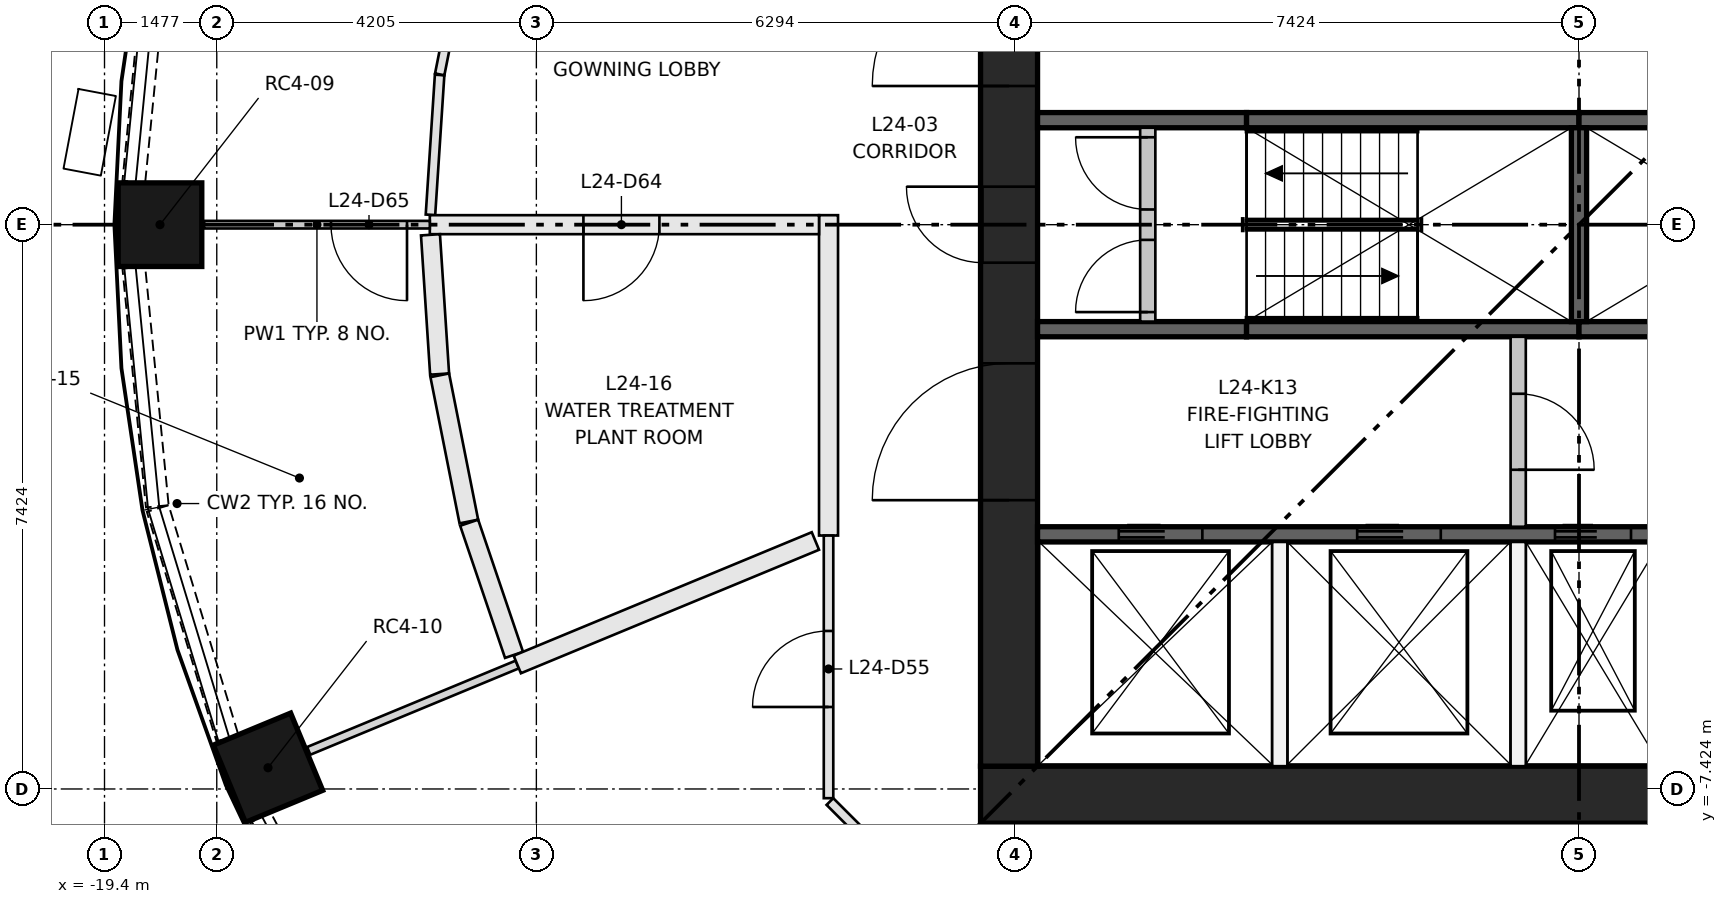
"""IFC4 building model, lengths in metres.
Left out: names, types, materials, properties, quantities, classifications, styles, units other than length and angle.
Written with IfcOpenShell. Run it as: python <this file> out.ifc"""

import sys

from ifc_helpers import new_model, si_unit, direction, frame, frame_2d, origin, origin_2d, place, context, subcontext, project, spatial, rectangle, extrude, element, fill, save


model = new_model("IFC4")
c1 = context("Model", 3, precision=1e-05, world=origin(), true_north=direction((0.0, 1.0)))
c2 = subcontext(c1, "Body", "Model", "MODEL_VIEW")
j1 = project(units=[si_unit("LENGTHUNIT", "METRE"), si_unit("PLANEANGLEUNIT", "RADIAN")], contexts=[c1])
p1 = place(None, origin())
s1 = spatial("IfcSite", under=j1, at=p1, CompositionType="ELEMENT")
p2 = place(p1, origin())
s2 = spatial("IfcBuilding", under=s1, at=p2, CompositionType="ELEMENT")
p3 = place(p2, frame((0.0, 0.0, 94.65)))
s3 = spatial("IfcBuildingStorey", under=s2, at=p3, CompositionType="ELEMENT", Elevation=94.65)
for number, where, z_axis, x_axis in (
    (1, (-18.67, 0.0, 0.0), (0.0, 0.0, 1.0), (-1.0, 0.0, 0.0)),
    (2, (-17.249, -7.145, 0.0), (0.0, 0.0, 1.0), (-0.924, -0.383, 0.0)),
):
    element("IfcColumn", number, at=place(p3, frame(where, z_axis=z_axis, x_axis=x_axis)), inside=s3, PredefinedType="COLUMN", context=c2, shape_type="SweptSolid", body=[
        extrude(rectangle(XDim=1.1, YDim=1.1, at=origin_2d()), origin(), (0.0, 0.0, 1.0), 3.65),
    ])
p4 = place(p3, frame((-7.874, -7.499, 0.0), z_axis=(0.0, 0.0, 1.0), x_axis=(1.0, 0.0, 0.0)))
e3 = element("IfcWall", 3, at=p4, inside=s3, PredefinedType="SHEAR", context=c2, shape_type="SweptSolid", body=[
    extrude(rectangle(XDim=15.748, YDim=0.75, at=frame_2d((7.874, 0.0))), origin(), (0.0, 0.0, 1.0), 3.65),
])
p5 = place(p3, frame((-7.499, -7.124, 0.0), z_axis=(0.0, 0.0, 1.0), x_axis=(0.0, 1.0, 0.0)))
e4 = element("IfcWall", 4, at=p5, inside=s3, PredefinedType="SHEAR", context=c2, shape_type="SweptSolid", body=[
    extrude(rectangle(XDim=14.248, YDim=0.75, at=frame_2d((7.124, 0.0))), origin(), (0.0, 0.0, 1.0), 3.65),
])
p6 = place(p5, frame((6.624, 0.0, 0.0)))
e5 = element("IfcOpeningElement", 5, at=p6, cuts=e4, PredefinedType="OPENING", context=c2, shape_type="SweptSolid", body=[
    extrude(rectangle(XDim=1.0, YDim=2.1, at=frame_2d((0.5, 1.05))), frame((0.0, 0.385, 0.0), z_axis=(0.0, -1.0, 0.0), x_axis=(1.0, 0.0, 0.0)), (0.0, 0.0, 1.0), 0.77),
])
p7 = place(p5, frame((3.5, 0.0, 0.0)))
e6 = element("IfcOpeningElement", 6, at=p7, cuts=e4, PredefinedType="OPENING", context=c2, shape_type="SweptSolid", body=[
    extrude(rectangle(XDim=1.8, YDim=2.1, at=frame_2d((0.9, 1.05))), frame((0.0, 0.385, 0.0), z_axis=(0.0, -1.0, 0.0), x_axis=(1.0, 0.0, 0.0)), (0.0, 0.0, 1.0), 0.77),
])
p8 = place(p5, frame((8.948, 0.0, 0.0)))
e7 = element("IfcOpeningElement", 7, at=p8, cuts=e4, PredefinedType="OPENING", context=c2, shape_type="SweptSolid", body=[
    extrude(rectangle(XDim=1.8, YDim=2.1, at=frame_2d((0.9, 1.05))), frame((0.0, 0.385, 0.0), z_axis=(0.0, -1.0, 0.0), x_axis=(1.0, 0.0, 0.0)), (0.0, 0.0, 1.0), 0.77),
])
p9 = place(p5, frame((12.124, 0.0, 0.0)))
e8 = element("IfcOpeningElement", 8, at=p9, cuts=e4, PredefinedType="OPENING", context=c2, shape_type="SweptSolid", body=[
    extrude(rectangle(XDim=1.0, YDim=2.1, at=frame_2d((0.5, 1.05))), frame((0.0, 0.385, 0.0), z_axis=(0.0, -1.0, 0.0), x_axis=(1.0, 0.0, 0.0)), (0.0, 0.0, 1.0), 0.77),
])
p10 = place(p3, frame((-7.124, -4.074, 0.0), z_axis=(0.0, 0.0, 1.0), x_axis=(1.0, 0.0, 0.0)))
e9 = element("IfcWall", 9, at=p10, inside=s3, PredefinedType="SHEAR", context=c2, shape_type="SweptSolid", body=[
    extrude(rectangle(XDim=14.248, YDim=0.2, at=frame_2d((7.124, 0.0))), origin(), (0.0, 0.0, 1.0), 3.3),
])
p11 = place(p10, frame((1.069, 0.0, 0.0)))
e10 = element("IfcOpeningElement", 10, at=p11, cuts=e9, PredefinedType="OPENING", context=c2, shape_type="SweptSolid", body=[
    extrude(rectangle(XDim=1.1, YDim=2.1, at=frame_2d((0.55, 1.05))), frame((0.0, 0.11, 0.0), z_axis=(0.0, -1.0, 0.0), x_axis=(1.0, 0.0, 0.0)), (0.0, 0.0, 1.0), 0.22),
])
p12 = place(p10, frame((4.206, 0.0, 0.0)))
e11 = element("IfcOpeningElement", 11, at=p12, cuts=e9, PredefinedType="OPENING", context=c2, shape_type="SweptSolid", body=[
    extrude(rectangle(XDim=1.1, YDim=2.1, at=frame_2d((0.55, 1.05))), frame((0.0, 0.11, 0.0), z_axis=(0.0, -1.0, 0.0), x_axis=(1.0, 0.0, 0.0)), (0.0, 0.0, 1.0), 0.22),
])
p13 = place(p10, frame((6.808, 0.0, 0.0)))
e12 = element("IfcOpeningElement", 12, at=p13, cuts=e9, PredefinedType="OPENING", context=c2, shape_type="SweptSolid", body=[
    extrude(rectangle(XDim=1.0, YDim=2.1, at=frame_2d((0.5, 1.05))), frame((0.0, 0.11, 0.0), z_axis=(0.0, -1.0, 0.0), x_axis=(1.0, 0.0, 0.0)), (0.0, 0.0, 1.0), 0.22),
])
p14 = place(p10, frame((8.777, 0.0, 0.0)))
e13 = element("IfcOpeningElement", 13, at=p14, cuts=e9, PredefinedType="OPENING", context=c2, shape_type="SweptSolid", body=[
    extrude(rectangle(XDim=1.0, YDim=2.1, at=frame_2d((0.5, 1.05))), frame((0.0, 0.11, 0.0), z_axis=(0.0, -1.0, 0.0), x_axis=(1.0, 0.0, 0.0)), (0.0, 0.0, 1.0), 0.22),
])
p15 = place(p10, frame((10.745, 0.0, 0.0)))
e14 = element("IfcOpeningElement", 14, at=p15, cuts=e9, PredefinedType="OPENING", context=c2, shape_type="SweptSolid", body=[
    extrude(rectangle(XDim=1.0, YDim=2.1, at=frame_2d((0.5, 1.05))), frame((0.0, 0.11, 0.0), z_axis=(0.0, -1.0, 0.0), x_axis=(1.0, 0.0, 0.0)), (0.0, 0.0, 1.0), 0.22),
])
p16 = place(p10, frame((12.714, 0.0, 0.0)))
e15 = element("IfcOpeningElement", 15, at=p16, cuts=e9, PredefinedType="OPENING", context=c2, shape_type="SweptSolid", body=[
    extrude(rectangle(XDim=1.0, YDim=2.1, at=frame_2d((0.5, 1.05))), frame((0.0, 0.11, 0.0), z_axis=(0.0, -1.0, 0.0), x_axis=(1.0, 0.0, 0.0)), (0.0, 0.0, 1.0), 0.22),
])
p17 = place(p3, frame((-7.124, -1.375, 0.0), z_axis=(0.0, 0.0, 1.0), x_axis=(1.0, 0.0, 0.0)))
e16 = element("IfcWall", 16, at=p17, inside=s3, PredefinedType="SHEAR", context=c2, shape_type="SweptSolid", body=[
    extrude(rectangle(XDim=2.75, YDim=0.2, at=frame_2d((1.375, 0.0))), origin(), (0.0, 0.0, 1.0), 3.3),
])
for number, where, z_axis, x_axis in (
    (17, (-4.374, -1.375, 0.0), (0.0, 0.0, 1.0), (1.0, 0.0, 0.0)),
    (18, (0.0, -1.375, 0.0), (0.0, 0.0, 1.0), (1.0, 0.0, 0.0)),
):
    element("IfcWall", number, at=place(p3, frame(where, z_axis=z_axis, x_axis=x_axis)), inside=s3, PredefinedType="SHEAR", context=c2, shape_type="SweptSolid", body=[
        extrude(rectangle(XDim=4.374, YDim=0.2, at=frame_2d((2.187, 0.0))), origin(), (0.0, 0.0, 1.0), 3.3),
    ])
p18 = place(p3, frame((-7.124, 1.375, 0.0), z_axis=(0.0, 0.0, 1.0), x_axis=(1.0, 0.0, 0.0)))
e19 = element("IfcWall", 19, at=p18, inside=s3, PredefinedType="SHEAR", context=c2, shape_type="SweptSolid", body=[
    extrude(rectangle(XDim=2.75, YDim=0.2, at=frame_2d((1.375, 0.0))), origin(), (0.0, 0.0, 1.0), 3.3),
])
for number, where, z_axis, x_axis in (
    (20, (-4.374, 1.375, 0.0), (0.0, 0.0, 1.0), (1.0, 0.0, 0.0)),
    (21, (0.0, 1.375, 0.0), (0.0, 0.0, 1.0), (1.0, 0.0, 0.0)),
):
    element("IfcWall", number, at=place(p3, frame(where, z_axis=z_axis, x_axis=x_axis)), inside=s3, PredefinedType="SHEAR", context=c2, shape_type="SweptSolid", body=[
        extrude(rectangle(XDim=4.374, YDim=0.2, at=frame_2d((2.187, 0.0))), origin(), (0.0, 0.0, 1.0), 3.3),
    ])
p19 = place(p3, frame((0.0, -1.275, 0.0), z_axis=(0.0, 0.0, 1.0), x_axis=(0.0, 1.0, 0.0)))
e22 = element("IfcWall", 22, at=p19, inside=s3, PredefinedType="SHEAR", context=c2, shape_type="SweptSolid", body=[
    extrude(rectangle(XDim=2.55, YDim=0.2, at=frame_2d((1.275, 0.0))), origin(), (0.0, 0.0, 1.0), 3.3),
])
for number, where, z_axis, x_axis in (
    (23, (-3.937, -7.124, 0.0), (0.0, 0.0, 1.0), (0.0, 1.0, 0.0)),
    (24, (-0.8, -7.124, 0.0), (0.0, 0.0, 1.0), (0.0, 1.0, 0.0)),
):
    element("IfcWall", number, at=place(p3, frame(where, z_axis=z_axis, x_axis=x_axis)), inside=s3, PredefinedType="PARTITIONING", context=c2, shape_type="SweptSolid", body=[
        extrude(rectangle(XDim=2.95, YDim=0.2, at=frame_2d((1.475, 0.0))), origin(), (0.0, 0.0, 1.0), 3.3),
    ])
p20 = place(p3, frame((-0.8, -3.974, 0.0), z_axis=(0.0, 0.0, 1.0), x_axis=(0.0, 1.0, 0.0)))
e25 = element("IfcWall", 25, at=p20, inside=s3, PredefinedType="PARTITIONING", context=c2, shape_type="SweptSolid", body=[
    extrude(rectangle(XDim=2.499, YDim=0.2, at=frame_2d((1.25, 0.0))), origin(), (0.0, 0.0, 1.0), 3.3),
])
p21 = place(p20, frame((0.75, 0.0, 0.0)))
e26 = element("IfcOpeningElement", 26, at=p21, cuts=e25, PredefinedType="OPENING", context=c2, shape_type="SweptSolid", body=[
    extrude(rectangle(XDim=1.0, YDim=2.1, at=frame_2d((0.5, 1.05))), frame((0.0, 0.11, 0.0), z_axis=(0.0, -1.0, 0.0), x_axis=(1.0, 0.0, 0.0)), (0.0, 0.0, 1.0), 0.22),
])
p22 = place(p3, frame((-5.674, -1.275, 0.0), z_axis=(0.0, 0.0, 1.0), x_axis=(0.0, 1.0, 0.0)))
e27 = element("IfcWall", 27, at=p22, inside=s3, PredefinedType="PARTITIONING", context=c2, shape_type="SweptSolid", body=[
    extrude(rectangle(XDim=2.55, YDim=0.2, at=frame_2d((1.275, 0.0))), origin(), (0.0, 0.0, 1.0), 3.3),
])
p23 = place(p22, frame((0.125, 0.0, 0.0)))
e28 = element("IfcOpeningElement", 28, at=p23, cuts=e27, PredefinedType="OPENING", context=c2, shape_type="SweptSolid", body=[
    extrude(rectangle(XDim=0.95, YDim=2.1, at=frame_2d((0.475, 1.05))), frame((0.0, 0.11, 0.0), z_axis=(0.0, -1.0, 0.0), x_axis=(1.0, 0.0, 0.0)), (0.0, 0.0, 1.0), 0.22),
])
p24 = place(p22, frame((1.475, 0.0, 0.0)))
e29 = element("IfcOpeningElement", 29, at=p24, cuts=e27, PredefinedType="OPENING", context=c2, shape_type="SweptSolid", body=[
    extrude(rectangle(XDim=0.95, YDim=2.1, at=frame_2d((0.475, 1.05))), frame((0.0, 0.11, 0.0), z_axis=(0.0, -1.0, 0.0), x_axis=(1.0, 0.0, 0.0)), (0.0, 0.0, 1.0), 0.22),
])
for number, where, z_axis, x_axis in (
    (30, (-18.706, 3.705, 0.0), (0.0, 0.0, 1.0), (-0.098, -0.995, 0.0)),
    (31, (-19.014, -0.564, 0.0), (0.0, 0.0, 1.0), (0.098, -0.995, 0.0)),
):
    element("IfcWall", number, at=place(p3, frame(where, z_axis=z_axis, x_axis=x_axis)), inside=s3, PredefinedType="SOLIDWALL", context=c2, shape_type="SweptSolid", body=[
        extrude(rectangle(XDim=3.156, YDim=0.3, at=frame_2d((1.578, 0.0))), origin(), (0.0, 0.0, 1.0), 0.9),
    ])
p25 = place(p3, frame((-18.7, -3.734, 0.0), z_axis=(0.0, 0.0, 1.0), x_axis=(0.290503096001, -0.956874051907, 0.0)))
e32 = element("IfcWall", 32, at=p25, inside=s3, PredefinedType="SOLIDWALL", context=c2, shape_type="SweptSolid", body=[
    extrude(rectangle(XDim=3.157, YDim=0.3, at=frame_2d((1.579, 0.0))), origin(), (0.0, 0.0, 1.0), 0.9),
])
p26 = place(p3, frame((-17.351, -7.797, 0.0), z_axis=(0.0, 0.0, 1.0), x_axis=(0.471238306932, -0.882005928597, 0.0)))
e33 = element("IfcWall", 33, at=p26, inside=s3, PredefinedType="SOLIDWALL", context=c2, shape_type="SweptSolid", body=[
    extrude(rectangle(XDim=3.157, YDim=0.3, at=frame_2d((1.579, 0.0))), origin(), (0.0, 0.0, 1.0), 0.9),
])
p27 = place(p3, frame((-9.874, -4.09, 0.0), z_axis=(0.0, 0.0, 1.0), x_axis=(0.0, 1.0, 0.0)))
e34 = element("IfcWall", 34, at=p27, inside=s3, PredefinedType="PARTITIONING", context=c2, shape_type="SweptSolid", body=[
    extrude(rectangle(XDim=4.215, YDim=0.25, at=frame_2d((2.107, 0.0))), origin(), (0.0, 0.0, 1.0), 3.3),
])
p28 = place(p3, frame((-9.874, -7.545, 0.0), z_axis=(0.0, 0.0, 1.0), x_axis=(0.0, 1.0, 0.0)))
e35 = element("IfcWall", 35, at=p28, inside=s3, PredefinedType="PARTITIONING", context=c2, shape_type="SweptSolid", body=[
    extrude(rectangle(XDim=3.455, YDim=0.125, at=frame_2d((1.728, 0.0))), origin(), (0.0, 0.0, 1.0), 3.3),
])
p29 = place(p28, frame((1.2, 0.0, 0.0)))
e36 = element("IfcOpeningElement", 36, at=p29, cuts=e35, PredefinedType="OPENING", context=c2, shape_type="SweptSolid", body=[
    extrude(rectangle(XDim=1.0, YDim=2.1, at=frame_2d((0.5, 1.05))), frame((0.0, 0.073, 0.0), z_axis=(0.0, -1.0, 0.0), x_axis=(1.0, 0.0, 0.0)), (0.0, 0.0, 1.0), 0.145),
])
p30 = place(p3, frame((-8.722, -8.722, 0.0), z_axis=(0.0, 0.0, 1.0), x_axis=(-0.70718294931, 0.707030604857, 0.0)))
e37 = element("IfcWall", 37, at=p30, inside=s3, PredefinedType="PARTITIONING", context=c2, shape_type="SweptSolid", body=[
    extrude(rectangle(XDim=1.603, YDim=0.125, at=frame_2d((0.801, 0.0))), origin(), (0.0, 0.0, 1.0), 3.3),
])
p31 = place(p3, frame((-15.112, 0.129, 0.0), z_axis=(0.0, 0.0, 1.0), x_axis=(0.065394347625, 0.997859498777, 0.0)))
e38 = element("IfcWall", 38, at=p31, inside=s3, PredefinedType="PARTITIONING", context=c2, shape_type="SweptSolid", body=[
    extrude(rectangle(XDim=1.844, YDim=0.125, at=frame_2d((0.922, 0.0))), origin(), (0.0, 0.0, 1.0), 3.3),
])
p32 = place(p3, frame((-14.99, 1.978, 0.0), z_axis=(0.0, 0.0, 1.0), x_axis=(0.194995562173, 0.980804124549, 0.0)))
e39 = element("IfcWall", 39, at=p32, inside=s3, PredefinedType="PARTITIONING", context=c2, shape_type="SweptSolid", body=[
    extrude(rectangle(XDim=1.969, YDim=0.125, at=frame_2d((0.985, 0.0))), origin(), (0.0, 0.0, 1.0), 3.3),
])
p33 = place(p32, frame((0.5, 0.0, 0.0)))
e40 = element("IfcOpeningElement", 40, at=p33, cuts=e39, PredefinedType="OPENING", context=c2, shape_type="SweptSolid", body=[
    extrude(rectangle(XDim=1.0, YDim=2.1, at=frame_2d((0.5, 1.05))), frame((0.0, 0.073, 0.0), z_axis=(0.0, -1.0, 0.0), x_axis=(1.0, 0.0, 0.0)), (0.0, 0.0, 1.0), 0.145),
])
p34 = place(p3, frame((-9.999, 0.0, 0.0), z_axis=(0.0, 0.0, 1.0), x_axis=(-1.0, 0.0, 0.0)))
e41 = element("IfcWall", 41, at=p34, inside=s3, PredefinedType="PARTITIONING", context=c2, shape_type="SweptSolid", body=[
    extrude(rectangle(XDim=5.121, YDim=0.25, at=frame_2d((2.561, 0.0))), origin(), (0.0, 0.0, 1.0), 3.3),
])
p35 = place(p34, frame((2.1, 0.0, 0.0)))
e42 = element("IfcOpeningElement", 42, at=p35, cuts=e41, PredefinedType="OPENING", context=c2, shape_type="SweptSolid", body=[
    extrude(rectangle(XDim=1.0, YDim=2.1, at=frame_2d((0.5, 1.05))), frame((0.0, 0.135, 0.0), z_axis=(0.0, -1.0, 0.0), x_axis=(1.0, 0.0, 0.0)), (0.0, 0.0, 1.0), 0.27),
])
p36 = place(p3, frame((-15.12, 0.0, 0.0), z_axis=(0.0, 0.0, 1.0), x_axis=(-1.0, 0.0, 0.0)))
e43 = element("IfcWall", 43, at=p36, inside=s3, PredefinedType="PARTITIONING", context=c2, shape_type="SweptSolid", body=[
    extrude(rectangle(XDim=2.97, YDim=0.1, at=frame_2d((1.485, 0.0))), origin(), (0.0, 0.0, 1.0), 3.3),
])
p37 = place(p36, frame((0.3, 0.0, 0.0)))
e44 = element("IfcOpeningElement", 44, at=p37, cuts=e43, PredefinedType="OPENING", context=c2, shape_type="SweptSolid", body=[
    extrude(rectangle(XDim=1.0, YDim=2.1, at=frame_2d((0.5, 1.05))), frame((0.0, 0.06, 0.0), z_axis=(0.0, -1.0, 0.0), x_axis=(1.0, 0.0, 0.0)), (0.0, 0.0, 1.0), 0.12),
])
p38 = place(p3, frame((-15.111, -0.133, 0.0), z_axis=(0.0, 0.0, 1.0), x_axis=(0.065424560105, -0.997857518354, 0.0)))
e45 = element("IfcWall", 45, at=p38, inside=s3, PredefinedType="PARTITIONING", context=c2, shape_type="SweptSolid", body=[
    extrude(rectangle(XDim=1.836, YDim=0.25, at=frame_2d((0.918, 0.0))), origin(), (0.0, 0.0, 1.0), 3.3),
])
p39 = place(p3, frame((-14.989, -1.982, 0.0), z_axis=(0.0, 0.0, 1.0), x_axis=(0.195062715887, -0.9807907712, 0.0)))
e46 = element("IfcWall", 46, at=p39, inside=s3, PredefinedType="PARTITIONING", context=c2, shape_type="SweptSolid", body=[
    extrude(rectangle(XDim=1.961, YDim=0.25, at=frame_2d((0.98, 0.0))), origin(), (0.0, 0.0, 1.0), 3.3),
])
p40 = place(p3, frame((-14.602, -3.921, 0.0), z_axis=(0.0, 0.0, 1.0), x_axis=(0.321528438759, -0.946899922415, 0.0)))
e47 = element("IfcWall", 47, at=p40, inside=s3, PredefinedType="PARTITIONING", context=c2, shape_type="SweptSolid", body=[
    extrude(rectangle(XDim=1.836, YDim=0.25, at=frame_2d((0.918, 0.0))), origin(), (0.0, 0.0, 1.0), 3.3),
])
p41 = place(p3, frame((-13.969, -5.786, 0.0), z_axis=(0.0, 0.0, 1.0), x_axis=(-0.923889594764, -0.382659139036, 0.0)))
e48 = element("IfcWall", 48, at=p41, inside=s3, PredefinedType="PARTITIONING", context=c2, shape_type="SweptSolid", body=[
    extrude(rectangle(XDim=2.97, YDim=0.11, at=frame_2d((1.485, 0.0))), origin(), (0.0, 0.0, 1.0), 3.3),
])
p42 = place(p3, frame((-10.047, -4.162, 0.0), z_axis=(0.0, 0.0, 1.0), x_axis=(-0.923886463326, -0.382666699469, 0.0)))
e49 = element("IfcWall", 49, at=p42, inside=s3, PredefinedType="PARTITIONING", context=c2, shape_type="SweptSolid", body=[
    extrude(rectangle(XDim=4.245, YDim=0.25, at=frame_2d((2.123, 0.0))), origin(), (0.0, 0.0, 1.0), 3.3),
])
p43 = place(p11, origin())
e50 = element("IfcDoor", 50, at=p43, inside=s3, OperationType="DOUBLE_DOOR_SLIDING", PredefinedType="DOOR", context=c2, shape_type="SweptSolid", body=[
    extrude(rectangle(XDim=1.1, YDim=2.1, at=frame_2d((0.55, 1.05))), frame((0.0, 0.025, 0.0), z_axis=(0.0, -1.0, 0.0), x_axis=(1.0, 0.0, 0.0)), (0.0, 0.0, 1.0), 0.05),
])
fill(e10, e50)
p44 = place(p12, origin())
e51 = element("IfcDoor", 51, at=p44, inside=s3, OperationType="DOUBLE_DOOR_SLIDING", PredefinedType="DOOR", context=c2, shape_type="SweptSolid", body=[
    extrude(rectangle(XDim=1.1, YDim=2.1, at=frame_2d((0.55, 1.05))), frame((0.0, 0.025, 0.0), z_axis=(0.0, -1.0, 0.0), x_axis=(1.0, 0.0, 0.0)), (0.0, 0.0, 1.0), 0.05),
])
fill(e11, e51)
p45 = place(p13, origin())
e52 = element("IfcDoor", 52, at=p45, inside=s3, OperationType="DOUBLE_DOOR_SLIDING", PredefinedType="DOOR", context=c2, shape_type="SweptSolid", body=[
    extrude(rectangle(XDim=1.0, YDim=2.1, at=frame_2d((0.5, 1.05))), frame((0.0, 0.025, 0.0), z_axis=(0.0, -1.0, 0.0), x_axis=(1.0, 0.0, 0.0)), (0.0, 0.0, 1.0), 0.05),
])
fill(e12, e52)
p46 = place(p23, origin())
e53 = element("IfcDoor", 53, at=p46, inside=s3, OperationType="SINGLE_SWING_LEFT", PredefinedType="DOOR", context=c2, shape_type="SweptSolid", body=[
    extrude(rectangle(XDim=0.95, YDim=2.1, at=frame_2d((0.475, 1.05))), frame((0.0, 0.025, 0.0), z_axis=(0.0, -1.0, 0.0), x_axis=(1.0, 0.0, 0.0)), (0.0, 0.0, 1.0), 0.05),
])
fill(e28, e53)
p47 = place(p24, origin())
e54 = element("IfcDoor", 54, at=p47, inside=s3, OperationType="SINGLE_SWING_RIGHT", PredefinedType="DOOR", context=c2, shape_type="SweptSolid", body=[
    extrude(rectangle(XDim=0.95, YDim=2.1, at=frame_2d((0.475, 1.05))), frame((0.0, 0.025, 0.0), z_axis=(0.0, -1.0, 0.0), x_axis=(1.0, 0.0, 0.0)), (0.0, 0.0, 1.0), 0.05),
])
fill(e29, e54)
p48 = place(p21, frame((1.0, 0.0, 0.0), z_axis=(0.0, 0.0, 1.0), x_axis=(-1.0, 0.0, 0.0)))
e55 = element("IfcDoor", 55, at=p48, inside=s3, OperationType="SINGLE_SWING_LEFT", PredefinedType="DOOR", context=c2, shape_type="SweptSolid", body=[
    extrude(rectangle(XDim=1.0, YDim=2.1, at=frame_2d((0.5, 1.05))), frame((0.0, 0.025, 0.0), z_axis=(0.0, -1.0, 0.0), x_axis=(1.0, 0.0, 0.0)), (0.0, 0.0, 1.0), 0.05),
])
fill(e26, e55)
p49 = place(p6, origin())
e56 = element("IfcDoor", 56, at=p49, inside=s3, OperationType="SINGLE_SWING_RIGHT", PredefinedType="DOOR", context=c2, shape_type="SweptSolid", body=[
    extrude(rectangle(XDim=1.0, YDim=2.1, at=frame_2d((0.5, 1.05))), frame((0.0, 0.375, 0.0), z_axis=(0.0, -1.0, 0.0), x_axis=(1.0, 0.0, 0.0)), (0.0, 0.0, 1.0), 0.05),
])
fill(e5, e56)
p50 = place(p7, origin())
e57 = element("IfcDoor", 57, at=p50, inside=s3, OperationType="DOUBLE_DOOR_SINGLE_SWING", PredefinedType="DOOR", context=c2, shape_type="SweptSolid", body=[
    extrude(rectangle(XDim=1.8, YDim=2.1, at=frame_2d((0.9, 1.05))), frame((0.0, 0.025, 0.0), z_axis=(0.0, -1.0, 0.0), x_axis=(1.0, 0.0, 0.0)), (0.0, 0.0, 1.0), 0.05),
])
fill(e6, e57)
p51 = place(p8, origin())
e58 = element("IfcDoor", 58, at=p51, inside=s3, OperationType="DOUBLE_DOOR_SINGLE_SWING", PredefinedType="DOOR", context=c2, shape_type="SweptSolid", body=[
    extrude(rectangle(XDim=1.8, YDim=2.1, at=frame_2d((0.9, 1.05))), frame((0.0, 0.025, 0.0), z_axis=(0.0, -1.0, 0.0), x_axis=(1.0, 0.0, 0.0)), (0.0, 0.0, 1.0), 0.05),
])
fill(e7, e58)
p52 = place(p29, origin())
e59 = element("IfcDoor", 59, at=p52, inside=s3, OperationType="SINGLE_SWING_LEFT", PredefinedType="DOOR", context=c2, shape_type="SweptSolid", body=[
    extrude(rectangle(XDim=1.0, YDim=2.1, at=frame_2d((0.5, 1.05))), frame((0.0, 0.025, 0.0), z_axis=(0.0, -1.0, 0.0), x_axis=(1.0, 0.0, 0.0)), (0.0, 0.0, 1.0), 0.05),
])
fill(e36, e59)
p53 = place(p35, origin())
e60 = element("IfcDoor", 60, at=p53, inside=s3, OperationType="SINGLE_SWING_RIGHT", PredefinedType="DOOR", context=c2, shape_type="SweptSolid", body=[
    extrude(rectangle(XDim=1.0, YDim=2.1, at=frame_2d((0.5, 1.05))), frame((0.0, 0.025, 0.0), z_axis=(0.0, -1.0, 0.0), x_axis=(1.0, 0.0, 0.0)), (0.0, 0.0, 1.0), 0.05),
])
fill(e42, e60)
p54 = place(p37, origin())
e61 = element("IfcDoor", 61, at=p54, inside=s3, OperationType="SINGLE_SWING_LEFT", PredefinedType="DOOR", context=c2, shape_type="SweptSolid", body=[
    extrude(rectangle(XDim=1.0, YDim=2.1, at=frame_2d((0.5, 1.05))), frame((0.0, 0.025, 0.0), z_axis=(0.0, -1.0, 0.0), x_axis=(1.0, 0.0, 0.0)), (0.0, 0.0, 1.0), 0.05),
])
fill(e44, e61)
save(model, sys.argv[1])
